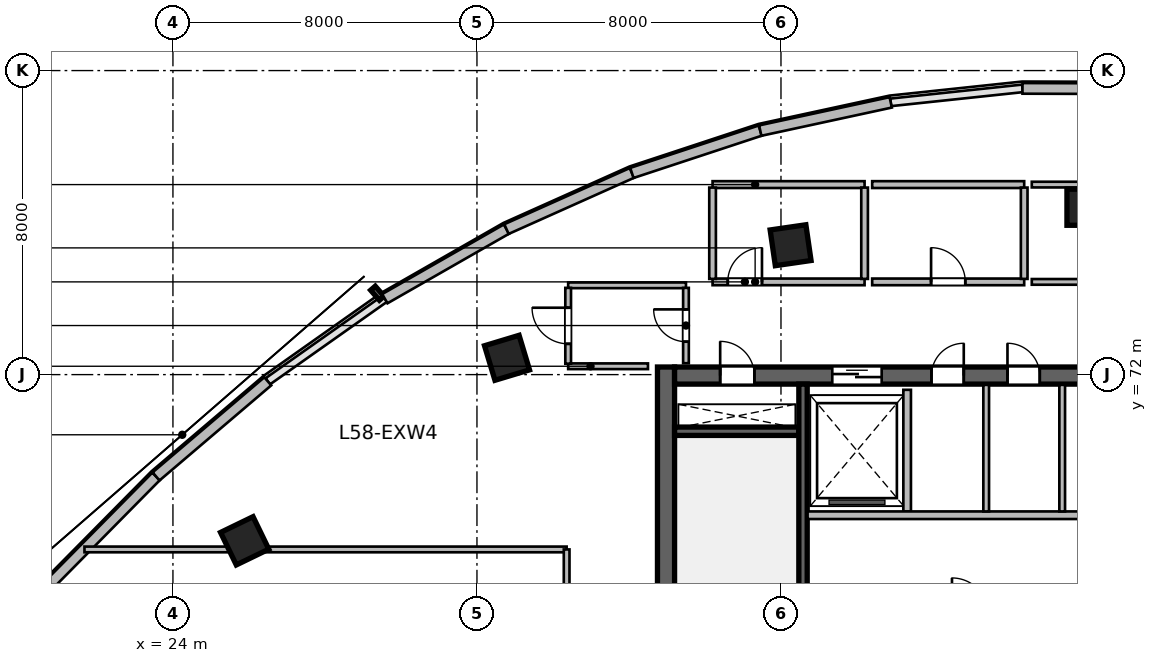
"""IFC4 building model, lengths in metres.
Left out: names, types, materials, properties, quantities, classifications, styles, units other than length and angle.
Written with IfcOpenShell. Run it as: python <this file> out.ifc"""

import sys

from ifc_helpers import new_model, si_unit, direction, frame, frame_2d, origin, origin_2d, place, context, subcontext, project, spatial, rectangle, extrude, source, transform, mapped, element, fill, save


model = new_model("IFC4")
c1 = context("Model", 3, precision=1e-05, world=origin(), true_north=direction((0.0, 1.0)))
c2 = subcontext(c1, "Body", "Model", "MODEL_VIEW")
j1 = project(units=[si_unit("LENGTHUNIT", "METRE"), si_unit("PLANEANGLEUNIT", "RADIAN")], contexts=[c1])
p1 = place(None, origin())
s1 = spatial("IfcSite", under=j1, at=p1, CompositionType="ELEMENT")
p2 = place(p1, origin())
s2 = spatial("IfcBuilding", under=s1, at=p2, CompositionType="ELEMENT")
p3 = place(p2, frame((0.0, 0.0, 239.1)))
s3 = spatial("IfcBuildingStorey", under=s2, at=p3, CompositionType="ELEMENT", Elevation=239.1)
m1 = source(origin(), c2, "Body", "SweptSolid", [
    extrude(rectangle(XDim=12.0, YDim=0.45, at=frame_2d((6.0, 0.0))), origin(), (0.0, 0.0, 1.0), 3.9),
])
p4 = place(p3, frame((36.975, 60.2, 0.0), z_axis=(0.0, 0.0, 1.0), x_axis=(0.0, 1.0, 0.0)))
e1 = element("IfcWall", 1, at=p4, inside=s3, PredefinedType="SHEAR", context=c2, shape_type="MappedRepresentation", body=[
    mapped(m1, transform((0.0, 0.0, 0.0), scale=1.0)),
])
m2 = source(origin(), c2, "Body", "SweptSolid", [
    extrude(rectangle(XDim=21.6, YDim=0.45, at=frame_2d((10.8, 0.0))), origin(), (0.0, 0.0, 1.0), 3.9),
])
p5 = place(p3, frame((37.2, 71.975, 0.0), z_axis=(0.0, 0.0, 1.0), x_axis=(1.0, 0.0, 0.0)))
e2 = element("IfcWall", 2, at=p5, inside=s3, PredefinedType="SHEAR", context=c2, shape_type="MappedRepresentation", body=[
    mapped(m2, transform((0.0, 0.0, 0.0), scale=1.0)),
])
p6 = place(p5, frame((1.2, 0.0, 0.0)))
e3 = element("IfcOpeningElement", 3, at=p6, cuts=e2, PredefinedType="OPENING", context=c2, shape_type="SweptSolid", body=[
    extrude(rectangle(XDim=0.9, YDim=2.1, at=frame_2d((0.45, 1.05))), frame((0.0, 0.235, 0.0), z_axis=(0.0, -1.0, 0.0), x_axis=(1.0, 0.0, 0.0)), (0.0, 0.0, 1.0), 0.47),
])
p7 = place(p5, frame((14.7, 0.0, 0.0)))
e4 = element("IfcOpeningElement", 4, at=p7, cuts=e2, PredefinedType="OPENING", context=c2, shape_type="SweptSolid", body=[
    extrude(rectangle(XDim=1.2, YDim=2.15, at=frame_2d((0.6, 1.075))), frame((0.0, 0.235, 0.0), z_axis=(0.0, -1.0, 0.0), x_axis=(1.0, 0.0, 0.0)), (0.0, 0.0, 1.0), 0.47),
])
p8 = place(p5, frame((4.15, 0.0, 0.0)))
e5 = element("IfcOpeningElement", 5, at=p8, cuts=e2, PredefinedType="OPENING", context=c2, shape_type="SweptSolid", body=[
    extrude(rectangle(XDim=1.3, YDim=2.15, at=frame_2d((0.65, 1.075))), frame((0.0, 0.235, 0.0), z_axis=(0.0, -1.0, 0.0), x_axis=(1.0, 0.0, 0.0)), (0.0, 0.0, 1.0), 0.47),
])
p9 = place(p5, frame((6.76, 0.0, 0.0)))
e6 = element("IfcOpeningElement", 6, at=p9, cuts=e2, PredefinedType="OPENING", context=c2, shape_type="SweptSolid", body=[
    extrude(rectangle(XDim=0.85, YDim=2.1, at=frame_2d((0.425, 1.05))), frame((0.0, 0.235, 0.0), z_axis=(0.0, -1.0, 0.0), x_axis=(1.0, 0.0, 0.0)), (0.0, 0.0, 1.0), 0.47),
])
p10 = place(p5, frame((8.76, 0.0, 0.0)))
e7 = element("IfcOpeningElement", 7, at=p10, cuts=e2, PredefinedType="OPENING", context=c2, shape_type="SweptSolid", body=[
    extrude(rectangle(XDim=0.85, YDim=2.1, at=frame_2d((0.425, 1.05))), frame((0.0, 0.235, 0.0), z_axis=(0.0, -1.0, 0.0), x_axis=(1.0, 0.0, 0.0)), (0.0, 0.0, 1.0), 0.47),
])
p11 = place(p5, frame((10.725, 0.0, 0.0)))
e8 = element("IfcOpeningElement", 8, at=p11, cuts=e2, PredefinedType="OPENING", context=c2, shape_type="SweptSolid", body=[
    extrude(rectangle(XDim=0.85, YDim=2.1, at=frame_2d((0.425, 1.05))), frame((0.0, 0.235, 0.0), z_axis=(0.0, -1.0, 0.0), x_axis=(1.0, 0.0, 0.0)), (0.0, 0.0, 1.0), 0.47),
])
m3 = source(origin(), c2, "Body", "SweptSolid", [
    extrude(rectangle(XDim=3.27, YDim=0.22, at=frame_2d((1.635, 0.0))), origin(), (0.0, 0.0, 1.0), 3.9),
])
p12 = place(p3, frame((37.2, 70.51, 0.0), z_axis=(0.0, 0.0, 1.0), x_axis=(1.0, 0.0, 0.0)))
e9 = element("IfcWall", 9, at=p12, inside=s3, PredefinedType="SHEAR", context=c2, shape_type="MappedRepresentation", body=[
    mapped(m3, transform((0.0, 0.0, 0.0), scale=1.0)),
])
m4 = source(origin(), c2, "Body", "SweptSolid", [
    extrude(rectangle(XDim=11.1, YDim=0.22, at=frame_2d((5.55, 0.0))), origin(), (0.0, 0.0, 1.0), 3.9),
])
p13 = place(p3, frame((40.58, 60.65, 0.0), z_axis=(0.0, 0.0, 1.0), x_axis=(0.0, 1.0, 0.0)))
e10 = element("IfcWall", 10, at=p13, inside=s3, PredefinedType="SHEAR", context=c2, shape_type="MappedRepresentation", body=[
    mapped(m4, transform((0.0, 0.0, 0.0), scale=1.0)),
])
m5 = source(origin(), c2, "Body", "SweptSolid", [
    extrude(rectangle(XDim=0.95, YDim=0.95, at=origin_2d()), origin(), (0.0, 0.0, 1.0), 3.9),
])
for number, where, z_axis, x_axis in (
    (11, (25.888, 67.627, 0.0), (0.0, 0.0, 1.0), (-0.436, 0.9, 0.0)),
    (12, (32.791, 72.442, 0.0), (0.0, 0.0, 1.0), (-0.289, 0.957, 0.0)),
    (13, (40.253, 75.404, 0.0), (0.0, 0.0, 1.0), (-0.143, 0.99, 0.0)),
    (14, (48.0, 76.404, 0.0), (0.0, 0.0, 1.0), (0.0, 1.0, 0.0)),
):
    element("IfcColumn", number, at=place(p3, frame(where, z_axis=z_axis, x_axis=x_axis)), inside=s3, PredefinedType="COLUMN", context=c2, shape_type="MappedRepresentation", body=[
        mapped(m5, transform((0.0, 0.0, 0.0), scale=1.0)),
    ])
m6 = source(origin(), c2, "Body", "SweptSolid", [
    extrude(rectangle(XDim=4.052, YDim=0.28, at=frame_2d((2.026, 0.0))), origin(), (0.0, 0.0, 1.0), 3.65),
])
p14 = place(p3, frame((18.176, 63.4, 0.0), z_axis=(0.0, 0.0, 1.0), x_axis=(0.641765301437, 0.76690110045, 0.0)))
e15 = element("IfcWall", 15, at=p14, inside=s3, PredefinedType="SOLIDWALL", context=c2, shape_type="MappedRepresentation", body=[
    mapped(m6, transform((0.0, 0.0, 0.0), scale=1.0)),
])
m7 = source(origin(), c2, "Body", "SweptSolid", [
    extrude(rectangle(XDim=3.955, YDim=0.28, at=frame_2d((1.978, 0.0))), origin(), (0.0, 0.0, 1.0), 3.65),
])
p15 = place(p3, frame((20.776, 66.507, 0.0), z_axis=(0.0, 0.0, 1.0), x_axis=(0.702710517474, 0.711475880569, 0.0)))
e16 = element("IfcWall", 16, at=p15, inside=s3, PredefinedType="SOLIDWALL", context=c2, shape_type="MappedRepresentation", body=[
    mapped(m7, transform((0.0, 0.0, 0.0), scale=1.0)),
])
m8 = source(origin(), c2, "Body", "SweptSolid", [
    extrude(rectangle(XDim=3.86, YDim=0.28, at=frame_2d((1.93, 0.0))), origin(), (0.0, 0.0, 1.0), 3.65),
])
p16 = place(p3, frame((23.556, 69.321, 0.0), z_axis=(0.0, 0.0, 1.0), x_axis=(0.761497547739, 0.648167790613, 0.0)))
e17 = element("IfcWall", 17, at=p16, inside=s3, PredefinedType="SOLIDWALL", context=c2, shape_type="MappedRepresentation", body=[
    mapped(m8, transform((0.0, 0.0, 0.0), scale=1.0)),
])
m9 = source(origin(), c2, "Body", "SweptSolid", [
    extrude(rectangle(XDim=3.688, YDim=0.28, at=frame_2d((1.844, 0.0))), origin(), (0.0, 0.0, 1.0), 3.65),
])
p17 = place(p3, frame((29.576, 73.998, 0.0), z_axis=(0.0, 0.0, 1.0), x_axis=(0.867929289274, 0.496687778005, 0.0)))
e18 = element("IfcWall", 18, at=p17, inside=s3, PredefinedType="SOLIDWALL", context=c2, shape_type="MappedRepresentation", body=[
    mapped(m9, transform((0.0, 0.0, 0.0), scale=1.0)),
])
m10 = source(origin(), c2, "Body", "SweptSolid", [
    extrude(rectangle(XDim=3.616, YDim=0.28, at=frame_2d((1.808, 0.0))), origin(), (0.0, 0.0, 1.0), 3.65),
])
p18 = place(p3, frame((32.777, 75.829, 0.0), z_axis=(0.0, 0.0, 1.0), x_axis=(0.912719530576, 0.408586659726, 0.0)))
e19 = element("IfcWall", 19, at=p18, inside=s3, PredefinedType="SOLIDWALL", context=c2, shape_type="MappedRepresentation", body=[
    mapped(m10, transform((0.0, 0.0, 0.0), scale=1.0)),
])
m11 = source(origin(), c2, "Body", "SweptSolid", [
    extrude(rectangle(XDim=3.557, YDim=0.28, at=frame_2d((1.778, 0.0))), origin(), (0.0, 0.0, 1.0), 3.65),
])
p19 = place(p3, frame((36.077, 77.307, 0.0), z_axis=(0.0, 0.0, 1.0), x_axis=(0.949687460385, 0.31319918197, 0.0)))
e20 = element("IfcWall", 20, at=p19, inside=s3, PredefinedType="SOLIDWALL", context=c2, shape_type="MappedRepresentation", body=[
    mapped(m11, transform((0.0, 0.0, 0.0), scale=1.0)),
])
m12 = source(origin(), c2, "Body", "SweptSolid", [
    extrude(rectangle(XDim=3.513, YDim=0.28, at=frame_2d((1.756, 0.0))), origin(), (0.0, 0.0, 1.0), 3.65),
])
p20 = place(p3, frame((39.455, 78.421, 0.0), z_axis=(0.0, 0.0, 1.0), x_axis=(0.977366029072, 0.211555300611, 0.0)))
e21 = element("IfcWall", 21, at=p20, inside=s3, PredefinedType="SOLIDWALL", context=c2, shape_type="MappedRepresentation", body=[
    mapped(m12, transform((0.0, 0.0, 0.0), scale=1.0)),
])
m13 = source(origin(), c2, "Body", "SweptSolid", [
    extrude(rectangle(XDim=3.477, YDim=0.28, at=frame_2d((1.739, 0.0))), origin(), (0.0, 0.0, 1.0), 3.65),
])
p21 = place(p3, frame((46.355, 79.531, 0.0), z_axis=(0.0, 0.0, 1.0), x_axis=(0.999995652268, -0.002948804142, 0.0)))
e22 = element("IfcWall", 22, at=p21, inside=s3, PredefinedType="SOLIDWALL", context=c2, shape_type="MappedRepresentation", body=[
    mapped(m13, transform((0.0, 0.0, 0.0), scale=1.0)),
])
m14 = source(origin(), c2, "Body", "SweptSolid", [
    extrude(rectangle(XDim=3.2, YDim=0.2, at=frame_2d((1.6, 0.0))), origin(), (0.0, 0.0, 1.0), 3.65),
])
p22 = place(p3, frame((43.32, 68.4, 0.0), z_axis=(0.0, 0.0, 1.0), x_axis=(0.0, 1.0, 0.0)))
e23 = element("IfcWall", 23, at=p22, inside=s3, PredefinedType="SOLIDWALL", context=c2, shape_type="MappedRepresentation", body=[
    mapped(m14, transform((0.0, 0.0, 0.0), scale=1.0)),
])
m15 = source(origin(), c2, "Body", "SweptSolid", [
    extrude(rectangle(XDim=8.8, YDim=0.2, at=frame_2d((4.4, 0.0))), origin(), (0.0, 0.0, 1.0), 3.65),
])
p23 = place(p3, frame((40.7, 68.3, 0.0), z_axis=(0.0, 0.0, 1.0), x_axis=(1.0, 0.0, 0.0)))
e24 = element("IfcWall", 24, at=p23, inside=s3, PredefinedType="SOLIDWALL", context=c2, shape_type="MappedRepresentation", body=[
    mapped(m15, transform((0.0, 0.0, 0.0), scale=1.0)),
])
m16 = source(origin(), c2, "Body", "SweptSolid", [
    extrude(rectangle(XDim=3.33, YDim=0.15, at=frame_2d((1.665, 0.0))), origin(), (0.0, 0.0, 1.0), 3.65),
])
for number, where, z_axis, x_axis in (
    (25, (45.4, 68.4, 0.0), (0.0, 0.0, 1.0), (0.0, 1.0, 0.0)),
    (26, (47.4, 68.4, 0.0), (0.0, 0.0, 1.0), (0.0, 1.0, 0.0)),
):
    element("IfcWall", number, at=place(p3, frame(where, z_axis=z_axis, x_axis=x_axis)), inside=s3, PredefinedType="PARTITIONING", context=c2, shape_type="MappedRepresentation", body=[
        mapped(m16, transform((0.0, 0.0, 0.0), scale=1.0)),
    ])
m17 = source(origin(), c2, "Body", "SweptSolid", [
    extrude(rectangle(XDim=2.1, YDim=0.15, at=frame_2d((1.05, 0.0))), origin(), (0.0, 0.0, 1.0), 3.65),
])
p24 = place(p3, frame((34.4, 72.22, 0.0), z_axis=(0.0, 0.0, 1.0), x_axis=(1.0, 0.0, 0.0)))
e27 = element("IfcWall", 27, at=p24, inside=s3, PredefinedType="PARTITIONING", context=c2, shape_type="MappedRepresentation", body=[
    mapped(m17, transform((0.0, 0.0, 0.0), scale=1.0)),
])
m18 = source(origin(), c2, "Body", "SweptSolid", [
    extrude(rectangle(XDim=3.1, YDim=0.15, at=frame_2d((1.55, 0.0))), origin(), (0.0, 0.0, 1.0), 3.081),
])
p25 = place(p3, frame((34.4, 74.35, 0.0), z_axis=(0.0, 0.0, 1.0), x_axis=(1.0, 0.0, 0.0)))
e28 = element("IfcWall", 28, at=p25, inside=s3, PredefinedType="PARTITIONING", context=c2, shape_type="MappedRepresentation", body=[
    mapped(m18, transform((0.0, 0.0, 0.0), scale=1.0)),
])
m19 = source(origin(), c2, "Body", "SweptSolid", [
    extrude(rectangle(XDim=1.995, YDim=0.15, at=frame_2d((0.998, 0.0))), origin(), (0.0, 0.0, 1.0), 3.65),
])
p26 = place(p3, frame((34.4, 72.288, 0.0), z_axis=(0.0, 0.0, 1.0), x_axis=(0.0, 1.0, 0.0)))
e29 = element("IfcWall", 29, at=p26, inside=s3, PredefinedType="PARTITIONING", context=c2, shape_type="MappedRepresentation", body=[
    mapped(m19, transform((0.0, 0.0, 0.0), scale=1.0)),
])
p27 = place(p26, frame((0.522, 0.0, 0.0)))
e30 = element("IfcOpeningElement", 30, at=p27, cuts=e29, PredefinedType="OPENING", context=c2, shape_type="SweptSolid", body=[
    extrude(rectangle(XDim=0.95, YDim=2.1, at=frame_2d((0.475, 1.05))), frame((0.0, 0.085, 0.0), z_axis=(0.0, -1.0, 0.0), x_axis=(1.0, 0.0, 0.0)), (0.0, 0.0, 1.0), 0.17),
])
m20 = source(origin(), c2, "Body", "SweptSolid", [
    extrude(rectangle(XDim=1.982, YDim=0.15, at=frame_2d((0.991, 0.0))), origin(), (0.0, 0.0, 1.0), 3.65),
])
p28 = place(p3, frame((37.5, 72.3, 0.0), z_axis=(0.0, 0.0, 1.0), x_axis=(0.0, 1.0, 0.0)))
e31 = element("IfcWall", 31, at=p28, inside=s3, PredefinedType="PARTITIONING", context=c2, shape_type="MappedRepresentation", body=[
    mapped(m20, transform((0.0, 0.0, 0.0), scale=1.0)),
])
p29 = place(p28, frame((0.566, 0.0, 0.0)))
e32 = element("IfcOpeningElement", 32, at=p29, cuts=e31, PredefinedType="OPENING", context=c2, shape_type="SweptSolid", body=[
    extrude(rectangle(XDim=0.85, YDim=2.1, at=frame_2d((0.425, 1.05))), frame((0.0, 0.085, 0.0), z_axis=(0.0, -1.0, 0.0), x_axis=(1.0, 0.0, 0.0)), (0.0, 0.0, 1.0), 0.17),
])
m21 = source(origin(), c2, "Body", "SweptSolid", [
    extrude(rectangle(XDim=4.0, YDim=0.175, at=frame_2d((2.0, 0.0))), origin(), (0.0, 0.0, 1.0), 3.65),
])
p30 = place(p3, frame((38.2, 74.44, 0.0), z_axis=(0.0, 0.0, 1.0), x_axis=(1.0, 0.0, 0.0)))
e33 = element("IfcWall", 33, at=p30, inside=s3, PredefinedType="PARTITIONING", context=c2, shape_type="MappedRepresentation", body=[
    mapped(m21, transform((0.0, 0.0, 0.0), scale=1.0)),
])
p31 = place(p30, frame((0.4, 0.0, 0.0)))
e34 = element("IfcOpeningElement", 34, at=p31, cuts=e33, PredefinedType="OPENING", context=c2, shape_type="SweptSolid", body=[
    extrude(rectangle(XDim=0.9, YDim=2.08, at=frame_2d((0.45, 1.04))), frame((0.0, 0.098, 0.0), z_axis=(0.0, -1.0, 0.0), x_axis=(1.0, 0.0, 0.0)), (0.0, 0.0, 1.0), 0.195),
])
m22 = source(origin(), c2, "Body", "SweptSolid", [
    extrude(rectangle(XDim=4.0, YDim=0.18, at=frame_2d((2.0, 0.0))), origin(), (0.0, 0.0, 1.0), 3.65),
])
p32 = place(p3, frame((38.2, 77.0, 0.0), z_axis=(0.0, 0.0, 1.0), x_axis=(1.0, 0.0, 0.0)))
e35 = element("IfcWall", 35, at=p32, inside=s3, PredefinedType="PLUMBINGWALL", context=c2, shape_type="MappedRepresentation", body=[
    mapped(m22, transform((0.0, 0.0, 0.0), scale=1.0)),
])
m23 = source(origin(), c2, "Body", "SweptSolid", [
    extrude(rectangle(XDim=2.403, YDim=0.175, at=frame_2d((1.201, 0.0))), origin(), (0.0, 0.0, 1.0), 3.65),
])
for number, where, z_axis, x_axis in (
    (36, (38.2, 74.519, 0.0), (0.0, 0.0, 1.0), (0.0, 1.0, 0.0)),
    (37, (42.2, 74.519, 0.0), (0.0, 0.0, 1.0), (0.0, 1.0, 0.0)),
):
    element("IfcWall", number, at=place(p3, frame(where, z_axis=z_axis, x_axis=x_axis)), inside=s3, PredefinedType="PARTITIONING", context=c2, shape_type="MappedRepresentation", body=[
        mapped(m23, transform((0.0, 0.0, 0.0), scale=1.0)),
    ])
p33 = place(p3, frame((42.4, 74.44, 0.0), z_axis=(0.0, 0.0, 1.0), x_axis=(1.0, 0.0, 0.0)))
e38 = element("IfcWall", 38, at=p33, inside=s3, PredefinedType="PARTITIONING", context=c2, shape_type="MappedRepresentation", body=[
    mapped(m21, transform((0.0, 0.0, 0.0), scale=1.0)),
])
p34 = place(p33, frame((1.55, 0.0, 0.0)))
e39 = element("IfcOpeningElement", 39, at=p34, cuts=e38, PredefinedType="OPENING", context=c2, shape_type="SweptSolid", body=[
    extrude(rectangle(XDim=0.9, YDim=2.08, at=frame_2d((0.45, 1.04))), frame((0.0, 0.098, 0.0), z_axis=(0.0, -1.0, 0.0), x_axis=(1.0, 0.0, 0.0)), (0.0, 0.0, 1.0), 0.195),
])
p35 = place(p3, frame((42.4, 77.0, 0.0), z_axis=(0.0, 0.0, 1.0), x_axis=(1.0, 0.0, 0.0)))
e40 = element("IfcWall", 40, at=p35, inside=s3, PredefinedType="PLUMBINGWALL", context=c2, shape_type="MappedRepresentation", body=[
    mapped(m22, transform((0.0, 0.0, 0.0), scale=1.0)),
])
p36 = place(p3, frame((46.4, 74.519, 0.0), z_axis=(0.0, 0.0, 1.0), x_axis=(0.0, 1.0, 0.0)))
e41 = element("IfcWall", 41, at=p36, inside=s3, PredefinedType="PARTITIONING", context=c2, shape_type="MappedRepresentation", body=[
    mapped(m23, transform((0.0, 0.0, 0.0), scale=1.0)),
])
m24 = source(origin(), c2, "Body", "SweptSolid", [
    extrude(rectangle(XDim=4.4, YDim=0.15, at=frame_2d((2.2, 0.0))), origin(), (0.0, 0.0, 1.0), 3.65),
])
p37 = place(p3, frame((46.6, 74.44, 0.0), z_axis=(0.0, 0.0, 1.0), x_axis=(1.0, 0.0, 0.0)))
e42 = element("IfcWall", 42, at=p37, inside=s3, PredefinedType="PARTITIONING", context=c2, shape_type="MappedRepresentation", body=[
    mapped(m24, transform((0.0, 0.0, 0.0), scale=1.0)),
])
p38 = place(p37, frame((1.725, 0.0, 0.0)))
e43 = element("IfcOpeningElement", 43, at=p38, cuts=e42, PredefinedType="OPENING", context=c2, shape_type="SweptSolid", body=[
    extrude(rectangle(XDim=0.95, YDim=2.1, at=frame_2d((0.475, 1.05))), frame((0.0, 0.085, 0.0), z_axis=(0.0, -1.0, 0.0), x_axis=(1.0, 0.0, 0.0)), (0.0, 0.0, 1.0), 0.17),
])
p39 = place(p3, frame((46.6, 77.0, 0.0), z_axis=(0.0, 0.0, 1.0), x_axis=(1.0, 0.0, 0.0)))
e44 = element("IfcWall", 44, at=p39, inside=s3, PredefinedType="PARTITIONING", context=c2, shape_type="MappedRepresentation", body=[
    mapped(m24, transform((0.0, 0.0, 0.0), scale=1.0)),
])
m25 = source(origin(), c2, "Body", "SweptSolid", [
    extrude(rectangle(XDim=12.688, YDim=0.15, at=frame_2d((6.344, 0.0))), origin(), (0.0, 0.0, 1.0), 3.65),
])
p40 = place(p3, frame((21.672, 67.4, 0.0), z_axis=(0.0, 0.0, 1.0), x_axis=(1.0, 0.0, 0.0)))
e45 = element("IfcWall", 45, at=p40, inside=s3, PredefinedType="PARTITIONING", context=c2, shape_type="MappedRepresentation", body=[
    mapped(m25, transform((0.0, 0.0, 0.0), scale=1.0)),
])
m26 = source(origin(), c2, "Body", "SweptSolid", [
    extrude(rectangle(XDim=3.2, YDim=0.15, at=frame_2d((1.6, 0.0))), origin(), (0.0, 0.0, 1.0), 3.65),
])
p41 = place(p3, frame((34.36, 64.2, 0.0), z_axis=(0.0, 0.0, 1.0), x_axis=(0.0, 1.0, 0.0)))
e46 = element("IfcWall", 46, at=p41, inside=s3, PredefinedType="PARTITIONING", context=c2, shape_type="MappedRepresentation", body=[
    mapped(m26, transform((0.0, 0.0, 0.0), scale=1.0)),
])
p42 = place(p41, frame((1.125, 0.0, 0.0)))
e47 = element("IfcOpeningElement", 47, at=p42, cuts=e46, PredefinedType="OPENING", context=c2, shape_type="SweptSolid", body=[
    extrude(rectangle(XDim=0.95, YDim=2.1, at=frame_2d((0.475, 1.05))), frame((0.0, 0.085, 0.0), z_axis=(0.0, -1.0, 0.0), x_axis=(1.0, 0.0, 0.0)), (0.0, 0.0, 1.0), 0.17),
])
m27 = source(origin(), c2, "Body", "SweptSolid", [
    extrude(rectangle(XDim=0.9, YDim=2.1, at=frame_2d((0.45, 1.05))), frame((0.0, 0.025, 0.0), z_axis=(0.0, -1.0, 0.0), x_axis=(1.0, 0.0, 0.0)), (0.0, 0.0, 1.0), 0.05),
])
p43 = place(p6, origin())
e48 = element("IfcDoor", 48, at=p43, inside=s3, OperationType="SINGLE_SWING_LEFT", PredefinedType="DOOR", context=c2, shape_type="MappedRepresentation", body=[
    mapped(m27, transform((0.0, 0.0, 0.0), scale=1.0)),
])
fill(e3, e48)
m28 = source(origin(), c2, "Body", "SweptSolid", [
    extrude(rectangle(XDim=1.3, YDim=2.15, at=frame_2d((0.65, 1.075))), frame((0.0, 0.025, 0.0), z_axis=(0.0, -1.0, 0.0), x_axis=(1.0, 0.0, 0.0)), (0.0, 0.0, 1.0), 0.05),
])
p44 = place(p8, origin())
e49 = element("IfcDoor", 49, at=p44, inside=s3, OperationType="DOUBLE_DOOR_SLIDING", PredefinedType="DOOR", context=c2, shape_type="MappedRepresentation", body=[
    mapped(m28, transform((0.0, 0.0, 0.0), scale=1.0)),
])
fill(e5, e49)
m29 = source(origin(), c2, "Body", "SweptSolid", [
    extrude(rectangle(XDim=0.85, YDim=2.1, at=frame_2d((0.425, 1.05))), frame((0.0, 0.025, 0.0), z_axis=(0.0, -1.0, 0.0), x_axis=(1.0, 0.0, 0.0)), (0.0, 0.0, 1.0), 0.05),
])
p45 = place(p9, origin())
e50 = element("IfcDoor", 50, at=p45, inside=s3, OperationType="SINGLE_SWING_RIGHT", PredefinedType="DOOR", context=c2, shape_type="MappedRepresentation", body=[
    mapped(m29, transform((0.0, 0.0, 0.0), scale=1.0)),
])
fill(e6, e50)
p46 = place(p10, origin())
e51 = element("IfcDoor", 51, at=p46, inside=s3, OperationType="SINGLE_SWING_LEFT", PredefinedType="DOOR", context=c2, shape_type="MappedRepresentation", body=[
    mapped(m29, transform((0.0, 0.0, 0.0), scale=1.0)),
])
fill(e7, e51)
p47 = place(p29, origin())
e52 = element("IfcDoor", 52, at=p47, inside=s3, OperationType="SINGLE_SWING_RIGHT", PredefinedType="DOOR", context=c2, shape_type="MappedRepresentation", body=[
    mapped(m29, transform((0.0, 0.0, 0.0), scale=1.0)),
])
fill(e32, e52)
m30 = source(origin(), c2, "Body", "SweptSolid", [
    extrude(rectangle(XDim=0.9, YDim=2.08, at=frame_2d((0.45, 1.04))), frame((0.0, 0.025, 0.0), z_axis=(0.0, -1.0, 0.0), x_axis=(1.0, 0.0, 0.0)), (0.0, 0.0, 1.0), 0.05),
])
p48 = place(p31, origin())
e53 = element("IfcDoor", 53, at=p48, inside=s3, OperationType="SINGLE_SWING_RIGHT", PredefinedType="DOOR", context=c2, shape_type="MappedRepresentation", body=[
    mapped(m30, transform((0.0, 0.0, 0.0), scale=1.0)),
])
fill(e34, e53)
p49 = place(p34, origin())
e54 = element("IfcDoor", 54, at=p49, inside=s3, OperationType="SINGLE_SWING_LEFT", PredefinedType="DOOR", context=c2, shape_type="MappedRepresentation", body=[
    mapped(m30, transform((0.0, 0.0, 0.0), scale=1.0)),
])
fill(e39, e54)
m31 = source(origin(), c2, "Body", "SweptSolid", [
    extrude(rectangle(XDim=0.95, YDim=2.1, at=frame_2d((0.475, 1.05))), frame((0.0, 0.025, 0.0), z_axis=(0.0, -1.0, 0.0), x_axis=(1.0, 0.0, 0.0)), (0.0, 0.0, 1.0), 0.05),
])
p50 = place(p27, origin())
e55 = element("IfcDoor", 55, at=p50, inside=s3, OperationType="SINGLE_SWING_RIGHT", PredefinedType="DOOR", context=c2, shape_type="MappedRepresentation", body=[
    mapped(m31, transform((0.0, 0.0, 0.0), scale=1.0)),
])
fill(e30, e55)
save(model, sys.argv[1])
